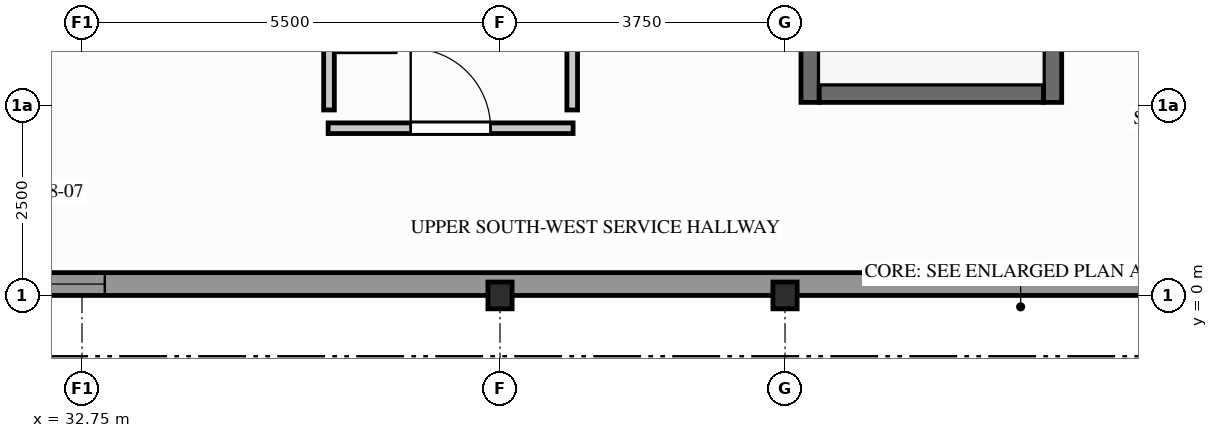
"""IFC4 building model, lengths in metres.
Left out: names, types, materials, properties, quantities, classifications, styles, units other than length and angle.
Written with IfcOpenShell. Run it as: python <this file> out.ifc"""

import sys

from ifc_helpers import new_model, si_unit, direction, frame, frame_2d, origin, origin_2d, place, context, subcontext, project, spatial, rectangle, i_section, extrude, element, fill, save


model = new_model("IFC4")
c1 = context("Model", 3, precision=1e-05, world=origin(), true_north=direction((0.0, 1.0)))
c2 = subcontext(c1, "Body", "Model", "MODEL_VIEW")
j1 = project(units=[si_unit("LENGTHUNIT", "METRE"), si_unit("PLANEANGLEUNIT", "RADIAN")], contexts=[c1])
p1 = place(None, origin())
s1 = spatial("IfcSite", under=j1, at=p1, CompositionType="ELEMENT")
p2 = place(p1, origin())
s2 = spatial("IfcBuilding", under=s1, at=p2, CompositionType="ELEMENT")
p3 = place(p2, frame((0.0, 0.0, 224.2)))
s3 = spatial("IfcBuildingStorey", under=s2, at=p3, CompositionType="ELEMENT", Elevation=224.2)
for number, where, z_axis, x_axis in (
    (1, (38.25, 0.0, 0.0), (0.0, 0.0, 1.0), (1.0, 0.0, 0.0)),
    (2, (42.0, 0.0, 0.0), (0.0, 0.0, 1.0), (1.0, 0.0, 0.0)),
):
    element("IfcColumn", number, at=place(p3, frame(where, z_axis=z_axis, x_axis=x_axis)), inside=s3, PredefinedType="COLUMN", context=c2, shape_type="SweptSolid", body=[
        extrude(i_section(OverallWidth=0.318, OverallDepth=0.353, WebThickness=0.023, FlangeThickness=0.038, FilletRadius=0.015, at=origin_2d()), origin(), (0.0, 0.0, 1.0), 3.1),
    ])
p4 = place(p3, frame((29.75, 0.15, 0.0), z_axis=(0.0, 0.0, 1.0), x_axis=(1.0, 0.0, 0.0)))
e3 = element("IfcWall", 3, at=p4, inside=s3, PredefinedType="STANDARD", context=c2, shape_type="SweptSolid", body=[
    extrude(rectangle(XDim=27.75, YDim=0.3, at=frame_2d((13.875, 0.0))), origin(), (0.0, 0.0, 1.0), 2.332),
])
p5 = place(p4, frame((2.5, 0.0, 0.712)))
e4 = element("IfcOpeningElement", 4, at=p5, cuts=e3, PredefinedType="OPENING", context=c2, shape_type="SweptSolid", body=[
    extrude(rectangle(XDim=0.8, YDim=1.4, at=frame_2d((0.4, 0.7))), frame((0.0, 0.16, 0.0), z_axis=(0.0, -1.0, 0.0), x_axis=(1.0, 0.0, 0.0)), (0.0, 0.0, 1.0), 0.32),
])
p6 = place(p4, frame((21.25, 0.0, 0.312)))
e5 = element("IfcOpeningElement", 5, at=p6, cuts=e3, PredefinedType="OPENING", context=c2, shape_type="SweptSolid", body=[
    extrude(rectangle(XDim=1.5, YDim=1.8, at=frame_2d((0.75, 0.9))), frame((0.0, 0.16, 0.0), z_axis=(0.0, -1.0, 0.0), x_axis=(1.0, 0.0, 0.0)), (0.0, 0.0, 1.0), 0.32),
])
for number, where, z_axis, x_axis in (
    (6, (42.33, 2.54, 0.0), (0.0, 0.0, 1.0), (0.0, 1.0, 0.0)),
    (7, (45.52, 2.54, 0.0), (0.0, 0.0, 1.0), (0.0, 1.0, 0.0)),
):
    element("IfcWall", number, at=place(p3, frame(where, z_axis=z_axis, x_axis=x_axis)), inside=s3, PredefinedType="SHEAR", context=c2, shape_type="SweptSolid", body=[
        extrude(rectangle(XDim=7.2, YDim=0.24, at=frame_2d((3.6, 0.0))), origin(), (0.0, 0.0, 1.0), 2.89),
    ])
p7 = place(p3, frame((42.45, 2.66, 0.0), z_axis=(0.0, 0.0, 1.0), x_axis=(1.0, 0.0, 0.0)))
e8 = element("IfcWall", 8, at=p7, inside=s3, PredefinedType="SHEAR", context=c2, shape_type="SweptSolid", body=[
    extrude(rectangle(XDim=2.95, YDim=0.24, at=frame_2d((1.475, 0.0))), origin(), (0.0, 0.0, 1.0), 2.89),
])
p8 = place(p3, frame((35.989, 2.2, 0.0), z_axis=(0.0, 0.0, 1.0), x_axis=(1.0, 0.0, 0.0)))
e9 = element("IfcWall", 9, at=p8, inside=s3, PredefinedType="PARTITIONING", context=c2, shape_type="SweptSolid", body=[
    extrude(rectangle(XDim=3.222, YDim=0.14, at=frame_2d((1.611, 0.0))), origin(), (0.0, 0.0, 1.0), 2.325),
])
p9 = place(p8, frame((1.086, 0.0, 0.0)))
e10 = element("IfcOpeningElement", 10, at=p9, cuts=e9, PredefinedType="OPENING", context=c2, shape_type="SweptSolid", body=[
    extrude(rectangle(XDim=1.05, YDim=2.06, at=frame_2d((0.525, 1.03))), frame((0.0, 0.08, 0.0), z_axis=(0.0, -1.0, 0.0), x_axis=(1.0, 0.0, 0.0)), (0.0, 0.0, 1.0), 0.16),
])
p10 = place(p3, frame((39.2, 2.44, 0.0), z_axis=(0.0, 0.0, 1.0), x_axis=(0.0, 1.0, 0.0)))
e11 = element("IfcWall", 11, at=p10, inside=s3, PredefinedType="PARTITIONING", context=c2, shape_type="SweptSolid", body=[
    extrude(rectangle(XDim=4.36, YDim=0.14, at=frame_2d((2.18, 0.0))), origin(), (0.0, 0.0, 1.0), 2.89),
])
p11 = place(p3, frame((36.0, 2.44, 0.0), z_axis=(0.0, 0.0, 1.0), x_axis=(0.0, 1.0, 0.0)))
e12 = element("IfcWall", 12, at=p11, inside=s3, PredefinedType="PARTITIONING", context=c2, shape_type="SweptSolid", body=[
    extrude(rectangle(XDim=0.836, YDim=0.14, at=frame_2d((0.418, 0.0))), origin(), (0.0, 0.0, 1.0), 2.89),
])
p12 = place(p5, origin())
e13 = element("IfcWindow", 13, at=p12, inside=s3, PartitioningType="SINGLE_PANEL", PredefinedType="WINDOW", context=c2, shape_type="SweptSolid", body=[
    extrude(rectangle(XDim=0.8, YDim=1.4, at=frame_2d((0.4, 0.7))), frame((0.0, 0.03, 0.0), z_axis=(0.0, -1.0, 0.0), x_axis=(1.0, 0.0, 0.0)), (0.0, 0.0, 1.0), 0.06),
])
fill(e4, e13)
p13 = place(p9, origin())
e14 = element("IfcDoor", 14, at=p13, inside=s3, OperationType="SINGLE_SWING_LEFT", PredefinedType="DOOR", context=c2, shape_type="SweptSolid", body=[
    extrude(rectangle(XDim=1.05, YDim=2.06, at=frame_2d((0.525, 1.03))), frame((0.0, 0.025, 0.0), z_axis=(0.0, -1.0, 0.0), x_axis=(1.0, 0.0, 0.0)), (0.0, 0.0, 1.0), 0.05),
])
fill(e10, e14)
save(model, sys.argv[1])
